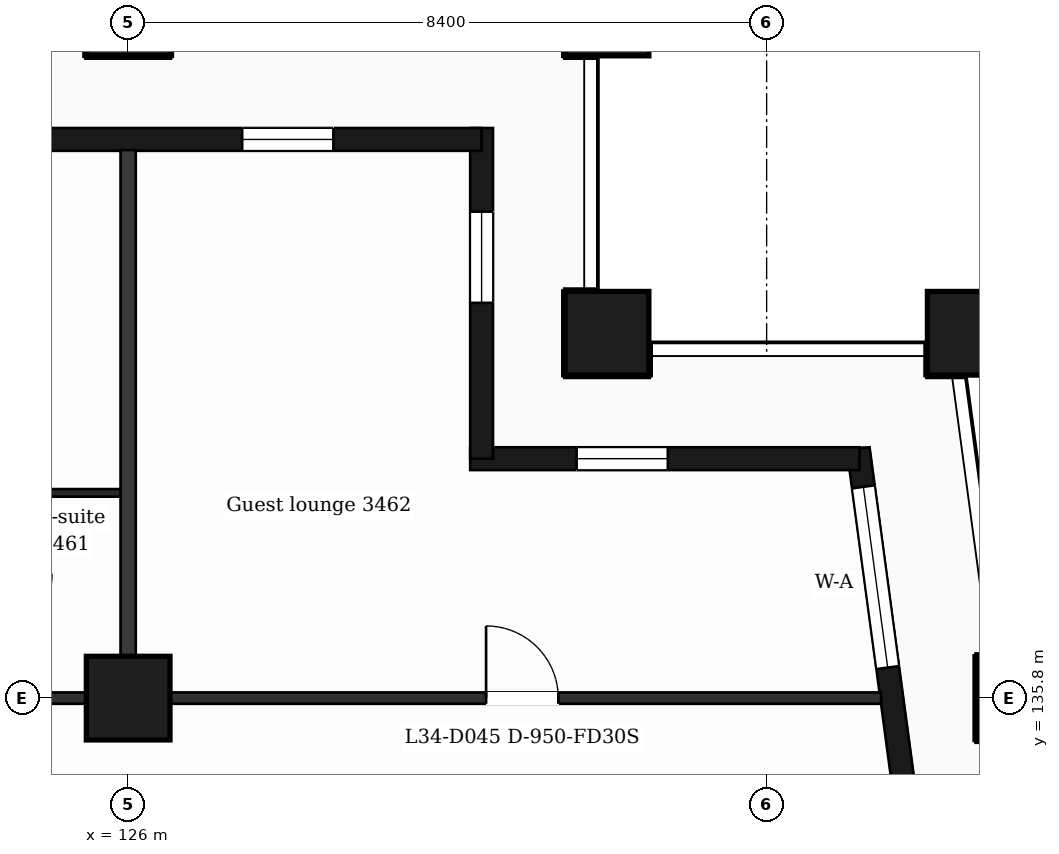
"""IFC4 building model, lengths in metres.
Left out: names, types, materials, properties, quantities, classifications, styles, units other than length and angle.
Written with IfcOpenShell. Run it as: python <this file> out.ifc"""

import sys

from ifc_helpers import new_model, si_unit, direction, frame, frame_2d, origin, origin_2d, place, context, subcontext, project, spatial, rectangle, extrude, element, fill, save


model = new_model("IFC4")
c1 = context("Model", 3, precision=1e-05, world=origin(), true_north=direction((0.0, 1.0)))
c2 = subcontext(c1, "Body", "Model", "MODEL_VIEW")
j1 = project(units=[si_unit("LENGTHUNIT", "METRE"), si_unit("PLANEANGLEUNIT", "RADIAN")], contexts=[c1])
p1 = place(None, origin())
s1 = spatial("IfcSite", under=j1, at=p1, CompositionType="ELEMENT")
p2 = place(p1, origin())
s2 = spatial("IfcBuilding", under=s1, at=p2, CompositionType="ELEMENT")
p3 = place(p2, frame((0.0, 0.0, 147.8)))
s3 = spatial("IfcBuildingStorey", under=s2, at=p3, CompositionType="ELEMENT", Elevation=147.8)
for number, where, z_axis, x_axis in (
    (1, (132.3, 140.6, 0.0), (0.0, 0.0, 1.0), (1.0, 0.0, 0.0)),
    (2, (137.065, 140.6, 0.0), (0.0, 0.0, 1.0), (1.0, 0.0, 0.0)),
    (3, (126.0, 135.8, 0.0), (0.0, 0.0, 1.0), (1.0, 0.0, 0.0)),
    (4, (137.711, 135.8, 0.0), (0.0, 0.0, 1.0), (1.0, 0.0, 0.0)),
    (5, (126.0, 144.8, 0.0), (0.0, 0.0, 1.0), (1.0, 0.0, 0.0)),
    (6, (132.3, 144.8, 0.0), (0.0, 0.0, 1.0), (1.0, 0.0, 0.0)),
):
    element("IfcColumn", number, at=place(p3, frame(where, z_axis=z_axis, x_axis=x_axis)), inside=s3, PredefinedType="COLUMN", context=c2, shape_type="SweptSolid", body=[
        extrude(rectangle(XDim=1.1, YDim=1.1, at=origin_2d()), origin(), (0.0, 0.0, 1.0), 3.7),
    ])
p4 = place(p3, frame((136.504, 132.4, 0.0), z_axis=(0.0, 0.0, 1.0), x_axis=(-0.133399697462, 0.99106231929, 0.0)))
e7 = element("IfcWall", 7, at=p4, inside=s3, PredefinedType="SOLIDWALL", context=c2, shape_type="SweptSolid", body=[
    extrude(rectangle(XDim=6.74, YDim=0.3, at=frame_2d((3.37, 0.0))), origin(), (0.0, 0.0, 1.0), 3.38),
])
p5 = place(p4, frame((1.115, 0.0, 0.0)))
e8 = element("IfcOpeningElement", 8, at=p5, cuts=e7, PredefinedType="OPENING", context=c2, shape_type="SweptSolid", body=[
    extrude(rectangle(XDim=1.2, YDim=2.4, at=frame_2d((0.6, 1.2))), frame((0.0, 0.16, 0.0), z_axis=(0.0, -1.0, 0.0), x_axis=(1.0, 0.0, 0.0)), (0.0, 0.0, 1.0), 0.32),
])
p6 = place(p4, frame((3.835, 0.0, 0.9)))
e9 = element("IfcOpeningElement", 9, at=p6, cuts=e7, PredefinedType="OPENING", context=c2, shape_type="SweptSolid", body=[
    extrude(rectangle(XDim=2.4, YDim=2.1, at=frame_2d((1.2, 1.05))), frame((0.0, 0.16, 0.0), z_axis=(0.0, -1.0, 0.0), x_axis=(1.0, 0.0, 0.0)), (0.0, 0.0, 1.0), 0.32),
])
p7 = place(p3, frame((135.623, 138.95, 0.0), z_axis=(0.0, 0.0, 1.0), x_axis=(-1.0, 0.0, 0.0)))
e10 = element("IfcWall", 10, at=p7, inside=s3, PredefinedType="SOLIDWALL", context=c2, shape_type="SweptSolid", body=[
    extrude(rectangle(XDim=5.123, YDim=0.3, at=frame_2d((2.561, 0.0))), origin(), (0.0, 0.0, 1.0), 3.38),
])
p8 = place(p7, frame((2.523, 0.0, 0.9)))
e11 = element("IfcOpeningElement", 11, at=p8, cuts=e10, PredefinedType="OPENING", context=c2, shape_type="SweptSolid", body=[
    extrude(rectangle(XDim=1.2, YDim=2.1, at=frame_2d((0.6, 1.05))), frame((0.0, 0.16, 0.0), z_axis=(0.0, -1.0, 0.0), x_axis=(1.0, 0.0, 0.0)), (0.0, 0.0, 1.0), 0.32),
])
p9 = place(p3, frame((130.65, 138.95, 0.0), z_axis=(0.0, 0.0, 1.0), x_axis=(0.0, 1.0, 0.0)))
e12 = element("IfcWall", 12, at=p9, inside=s3, PredefinedType="SOLIDWALL", context=c2, shape_type="SweptSolid", body=[
    extrude(rectangle(XDim=4.35, YDim=0.3, at=frame_2d((2.175, 0.0))), origin(), (0.0, 0.0, 1.0), 3.38),
])
p10 = place(p9, frame((2.05, 0.0, 0.9)))
e13 = element("IfcOpeningElement", 13, at=p10, cuts=e12, PredefinedType="OPENING", context=c2, shape_type="SweptSolid", body=[
    extrude(rectangle(XDim=1.2, YDim=2.1, at=frame_2d((0.6, 1.05))), frame((0.0, 0.16, 0.0), z_axis=(0.0, -1.0, 0.0), x_axis=(1.0, 0.0, 0.0)), (0.0, 0.0, 1.0), 0.32),
])
p11 = place(p3, frame((130.65, 143.15, 0.0), z_axis=(0.0, 0.0, 1.0), x_axis=(-1.0, 0.0, 0.0)))
e14 = element("IfcWall", 14, at=p11, inside=s3, PredefinedType="SOLIDWALL", context=c2, shape_type="SweptSolid", body=[
    extrude(rectangle(XDim=16.35, YDim=0.3, at=frame_2d((8.175, 0.0))), origin(), (0.0, 0.0, 1.0), 3.38),
])
p12 = place(p11, frame((1.95, 0.0, 0.9)))
e15 = element("IfcOpeningElement", 15, at=p12, cuts=e14, PredefinedType="OPENING", context=c2, shape_type="SweptSolid", body=[
    extrude(rectangle(XDim=1.2, YDim=2.1, at=frame_2d((0.6, 1.05))), frame((0.0, 0.16, 0.0), z_axis=(0.0, -1.0, 0.0), x_axis=(1.0, 0.0, 0.0)), (0.0, 0.0, 1.0), 0.32),
])
p13 = place(p11, frame((6.15, 0.0, 0.0)))
e16 = element("IfcOpeningElement", 16, at=p13, cuts=e14, PredefinedType="OPENING", context=c2, shape_type="SweptSolid", body=[
    extrude(rectangle(XDim=1.2, YDim=2.4, at=frame_2d((0.6, 1.2))), frame((0.0, 0.16, 0.0), z_axis=(0.0, -1.0, 0.0), x_axis=(1.0, 0.0, 0.0)), (0.0, 0.0, 1.0), 0.32),
])
p14 = place(p11, frame((9.75, 0.0, 0.9)))
e17 = element("IfcOpeningElement", 17, at=p14, cuts=e14, PredefinedType="OPENING", context=c2, shape_type="SweptSolid", body=[
    extrude(rectangle(XDim=2.4, YDim=2.1, at=frame_2d((1.2, 1.05))), frame((0.0, 0.16, 0.0), z_axis=(0.0, -1.0, 0.0), x_axis=(1.0, 0.0, 0.0)), (0.0, 0.0, 1.0), 0.32),
])
p15 = place(p11, frame((13.45, 0.0, 0.9)))
e18 = element("IfcOpeningElement", 18, at=p15, cuts=e14, PredefinedType="OPENING", context=c2, shape_type="SweptSolid", body=[
    extrude(rectangle(XDim=2.4, YDim=2.1, at=frame_2d((1.2, 1.05))), frame((0.0, 0.16, 0.0), z_axis=(0.0, -1.0, 0.0), x_axis=(1.0, 0.0, 0.0)), (0.0, 0.0, 1.0), 0.32),
])
p16 = place(p3, frame((90.895, 135.8, 0.0), z_axis=(0.0, 0.0, 1.0), x_axis=(1.0, 0.0, 0.0)))
e19 = element("IfcWall", 19, at=p16, inside=s3, PredefinedType="PARTITIONING", context=c2, shape_type="SweptSolid", body=[
    extrude(rectangle(XDim=45.011, YDim=0.15, at=frame_2d((22.505, 0.0))), origin(), (0.0, 0.0, 1.0), 3.38),
])
p17 = place(p16, frame((6.906, 0.0, 0.0)))
e20 = element("IfcOpeningElement", 20, at=p17, cuts=e19, PredefinedType="OPENING", context=c2, shape_type="SweptSolid", body=[
    extrude(rectangle(XDim=1.0, YDim=2.1, at=frame_2d((0.5, 1.05))), frame((0.0, 0.085, 0.0), z_axis=(0.0, -1.0, 0.0), x_axis=(1.0, 0.0, 0.0)), (0.0, 0.0, 1.0), 0.17),
])
p18 = place(p16, frame((12.935, 0.0, 0.0)))
e21 = element("IfcOpeningElement", 21, at=p18, cuts=e19, PredefinedType="OPENING", context=c2, shape_type="SweptSolid", body=[
    extrude(rectangle(XDim=1.0, YDim=2.1, at=frame_2d((0.5, 1.05))), frame((0.0, 0.085, 0.0), z_axis=(0.0, -1.0, 0.0), x_axis=(1.0, 0.0, 0.0)), (0.0, 0.0, 1.0), 0.17),
])
p19 = place(p16, frame((27.477, 0.0, 0.0)))
e22 = element("IfcOpeningElement", 22, at=p19, cuts=e19, PredefinedType="OPENING", context=c2, shape_type="SweptSolid", body=[
    extrude(rectangle(XDim=0.95, YDim=2.1, at=frame_2d((0.475, 1.05))), frame((0.0, 0.085, 0.0), z_axis=(0.0, -1.0, 0.0), x_axis=(1.0, 0.0, 0.0)), (0.0, 0.0, 1.0), 0.17),
])
p20 = place(p16, frame((31.555, 0.0, 0.0)))
e23 = element("IfcOpeningElement", 23, at=p20, cuts=e19, PredefinedType="OPENING", context=c2, shape_type="SweptSolid", body=[
    extrude(rectangle(XDim=0.95, YDim=2.1, at=frame_2d((0.475, 1.05))), frame((0.0, 0.085, 0.0), z_axis=(0.0, -1.0, 0.0), x_axis=(1.0, 0.0, 0.0)), (0.0, 0.0, 1.0), 0.17),
])
p21 = place(p16, frame((39.814, 0.0, 0.0)))
e24 = element("IfcOpeningElement", 24, at=p21, cuts=e19, PredefinedType="OPENING", context=c2, shape_type="SweptSolid", body=[
    extrude(rectangle(XDim=0.95, YDim=2.1, at=frame_2d((0.475, 1.05))), frame((0.0, 0.085, 0.0), z_axis=(0.0, -1.0, 0.0), x_axis=(1.0, 0.0, 0.0)), (0.0, 0.0, 1.0), 0.17),
])
p22 = place(p3, frame((124.15, 138.5, 0.0), z_axis=(0.0, 0.0, 1.0), x_axis=(1.0, 0.0, 0.0)))
e25 = element("IfcWall", 25, at=p22, inside=s3, PredefinedType="PARTITIONING", context=c2, shape_type="SweptSolid", body=[
    extrude(rectangle(XDim=1.85, YDim=0.1, at=frame_2d((0.925, 0.0))), origin(), (0.0, 0.0, 1.0), 3.38),
])
p23 = place(p3, frame((126.0, 135.875, 0.0), z_axis=(0.0, 0.0, 1.0), x_axis=(0.0, 1.0, 0.0)))
e26 = element("IfcWall", 26, at=p23, inside=s3, PredefinedType="PARTITIONING", context=c2, shape_type="SweptSolid", body=[
    extrude(rectangle(XDim=7.135, YDim=0.2, at=frame_2d((3.567, 0.0))), origin(), (0.0, 0.0, 1.0), 3.38),
])
p24 = place(p6, origin())
e27 = element("IfcWindow", 27, at=p24, inside=s3, PartitioningType="SINGLE_PANEL", PredefinedType="WINDOW", context=c2, shape_type="SweptSolid", body=[
    extrude(rectangle(XDim=2.4, YDim=2.1, at=frame_2d((1.2, 1.05))), frame((0.0, 0.03, 0.0), z_axis=(0.0, -1.0, 0.0), x_axis=(1.0, 0.0, 0.0)), (0.0, 0.0, 1.0), 0.06),
])
fill(e9, e27)
p25 = place(p8, origin())
e28 = element("IfcWindow", 28, at=p25, inside=s3, PartitioningType="SINGLE_PANEL", PredefinedType="WINDOW", context=c2, shape_type="SweptSolid", body=[
    extrude(rectangle(XDim=1.2, YDim=2.1, at=frame_2d((0.6, 1.05))), frame((0.0, 0.03, 0.0), z_axis=(0.0, -1.0, 0.0), x_axis=(1.0, 0.0, 0.0)), (0.0, 0.0, 1.0), 0.06),
])
fill(e11, e28)
p26 = place(p10, origin())
e29 = element("IfcWindow", 29, at=p26, inside=s3, PartitioningType="SINGLE_PANEL", PredefinedType="WINDOW", context=c2, shape_type="SweptSolid", body=[
    extrude(rectangle(XDim=1.2, YDim=2.1, at=frame_2d((0.6, 1.05))), frame((0.0, 0.03, 0.0), z_axis=(0.0, -1.0, 0.0), x_axis=(1.0, 0.0, 0.0)), (0.0, 0.0, 1.0), 0.06),
])
fill(e13, e29)
p27 = place(p12, origin())
e30 = element("IfcWindow", 30, at=p27, inside=s3, PartitioningType="SINGLE_PANEL", PredefinedType="WINDOW", context=c2, shape_type="SweptSolid", body=[
    extrude(rectangle(XDim=1.2, YDim=2.1, at=frame_2d((0.6, 1.05))), frame((0.0, 0.03, 0.0), z_axis=(0.0, -1.0, 0.0), x_axis=(1.0, 0.0, 0.0)), (0.0, 0.0, 1.0), 0.06),
])
fill(e15, e30)
p28 = place(p21, origin())
e31 = element("IfcDoor", 31, at=p28, inside=s3, OperationType="SINGLE_SWING_LEFT", PredefinedType="DOOR", context=c2, shape_type="SweptSolid", body=[
    extrude(rectangle(XDim=0.95, YDim=2.1, at=frame_2d((0.475, 1.05))), frame((0.0, 0.025, 0.0), z_axis=(0.0, -1.0, 0.0), x_axis=(1.0, 0.0, 0.0)), (0.0, 0.0, 1.0), 0.05),
])
fill(e24, e31)
save(model, sys.argv[1])
